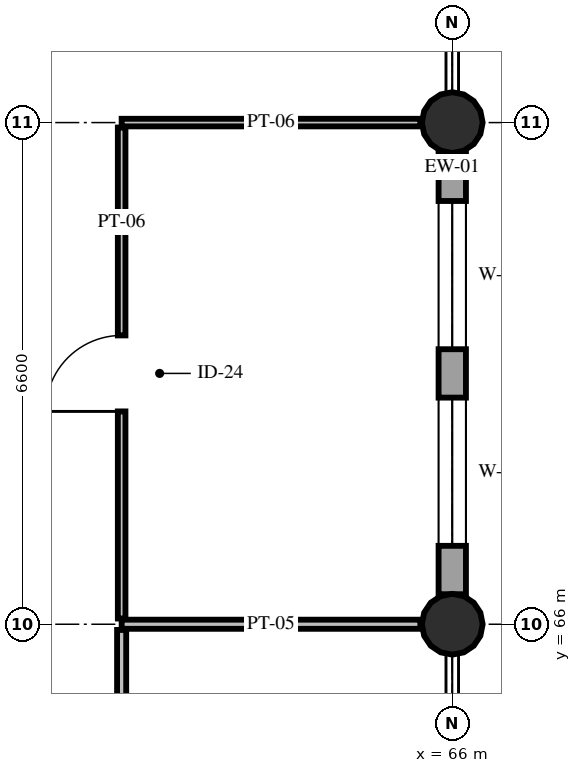
"""IFC4 building model, lengths in metres.
Left out: names, types, materials, properties, quantities, classifications, styles, units other than length and angle.
Written with IfcOpenShell. Run it as: python <this file> out.ifc"""

import sys

from ifc_helpers import new_model, si_unit, direction, frame, frame_2d, origin, origin_2d, place, context, subcontext, project, spatial, rectangle, circle, extrude, element, fill, save


model = new_model("IFC4")
c1 = context("Model", 3, precision=1e-05, world=origin(), true_north=direction((0.0, 1.0)))
c2 = subcontext(c1, "Body", "Model", "MODEL_VIEW")
j1 = project(units=[si_unit("LENGTHUNIT", "METRE"), si_unit("PLANEANGLEUNIT", "RADIAN")], contexts=[c1])
p1 = place(None, origin())
s1 = spatial("IfcSite", under=j1, at=p1, CompositionType="ELEMENT")
p2 = place(p1, origin())
s2 = spatial("IfcBuilding", under=s1, at=p2, CompositionType="ELEMENT")
p3 = place(p2, frame((0.0, 0.0, 10.2)))
s3 = spatial("IfcBuildingStorey", under=s2, at=p3, CompositionType="ELEMENT", Elevation=10.2)
for number, where, z_axis, x_axis in (
    (1, (66.0, 66.0, 0.0), (0.0, 0.0, 1.0), (1.0, 0.0, 0.0)),
    (2, (66.0, 72.6, 0.0), (0.0, 0.0, 1.0), (1.0, 0.0, 0.0)),
):
    element("IfcColumn", number, at=place(p3, frame(where, z_axis=z_axis, x_axis=x_axis)), inside=s3, PredefinedType="COLUMN", context=c2, shape_type="SweptSolid", body=[
        extrude(circle(Radius=0.4, at=origin_2d()), origin(), (0.0, 0.0, 1.0), 4.8),
    ])
p4 = place(p3, frame((66.0, 72.205, 0.0), z_axis=(0.0, 0.0, 1.0), x_axis=(0.0, -1.0, 0.0)))
e3 = element("IfcWall", 3, at=p4, inside=s3, PredefinedType="STANDARD", context=c2, shape_type="SweptSolid", body=[
    extrude(rectangle(XDim=5.81, YDim=0.36, at=frame_2d((2.905, 0.0))), origin(), (0.0, 0.0, 1.0), 3.95),
])
p5 = place(p4, frame((0.637, 0.0, 0.85)))
e4 = element("IfcOpeningElement", 4, at=p5, cuts=e3, PredefinedType="OPENING", context=c2, shape_type="SweptSolid", body=[
    extrude(rectangle(XDim=1.95, YDim=1.86, at=frame_2d((0.975, 0.93))), frame((0.0, 0.195, 0.0), z_axis=(0.0, -1.0, 0.0), x_axis=(1.0, 0.0, 0.0)), (0.0, 0.0, 1.0), 0.39),
])
p6 = place(p4, frame((3.223, 0.0, 0.85)))
e5 = element("IfcOpeningElement", 5, at=p6, cuts=e3, PredefinedType="OPENING", context=c2, shape_type="SweptSolid", body=[
    extrude(rectangle(XDim=1.95, YDim=1.86, at=frame_2d((0.975, 0.93))), frame((0.0, 0.195, 0.0), z_axis=(0.0, -1.0, 0.0), x_axis=(1.0, 0.0, 0.0)), (0.0, 0.0, 1.0), 0.39),
])
p7 = place(p3, frame((61.65, 66.0, 0.0), z_axis=(0.0, 0.0, 1.0), x_axis=(1.0, 0.0, 0.0)))
e6 = element("IfcWall", 6, at=p7, inside=s3, PredefinedType="PARTITIONING", context=c2, shape_type="SweptSolid", body=[
    extrude(rectangle(XDim=3.93, YDim=0.12, at=frame_2d((1.965, 0.0))), origin(), (0.0, 0.0, 1.0), 4.13),
])
p8 = place(p3, frame((61.65, 51.075, 0.0), z_axis=(0.0, 0.0, 1.0), x_axis=(0.0, 1.0, 0.0)))
e7 = element("IfcWall", 7, at=p8, inside=s3, PredefinedType="PARTITIONING", context=c2, shape_type="SweptSolid", body=[
    extrude(rectangle(XDim=14.85, YDim=0.12, at=frame_2d((7.425, 0.0))), origin(), (0.0, 0.0, 1.0), 4.13),
])
p9 = place(p8, frame((5.585, 0.0, 0.0)))
e8 = element("IfcOpeningElement", 8, at=p9, cuts=e7, PredefinedType="OPENING", context=c2, shape_type="SweptSolid", body=[
    extrude(rectangle(XDim=1.68, YDim=2.3, at=frame_2d((0.84, 1.15))), frame((0.0, 0.075, 0.0), z_axis=(0.0, -1.0, 0.0), x_axis=(1.0, 0.0, 0.0)), (0.0, 0.0, 1.0), 0.15),
])
p10 = place(p3, frame((61.65, 72.6, 0.0), z_axis=(0.0, 0.0, 1.0), x_axis=(1.0, 0.0, 0.0)))
e9 = element("IfcWall", 9, at=p10, inside=s3, PredefinedType="PARTITIONING", context=c2, shape_type="SweptSolid", body=[
    extrude(rectangle(XDim=3.93, YDim=0.1, at=frame_2d((1.965, 0.0))), origin(), (0.0, 0.0, 1.0), 4.13),
])
p11 = place(p3, frame((61.65, 66.075, 0.0), z_axis=(0.0, 0.0, 1.0), x_axis=(0.0, 1.0, 0.0)))
e10 = element("IfcWall", 10, at=p11, inside=s3, PredefinedType="PARTITIONING", context=c2, shape_type="SweptSolid", body=[
    extrude(rectangle(XDim=6.46, YDim=0.1, at=frame_2d((3.23, 0.0))), origin(), (0.0, 0.0, 1.0), 4.13),
])
p12 = place(p11, frame((2.725, 0.0, 0.0)))
e11 = element("IfcOpeningElement", 11, at=p12, cuts=e10, PredefinedType="OPENING", context=c2, shape_type="SweptSolid", body=[
    extrude(rectangle(XDim=1.0, YDim=2.15, at=frame_2d((0.5, 1.075))), frame((0.0, 0.065, 0.0), z_axis=(0.0, -1.0, 0.0), x_axis=(1.0, 0.0, 0.0)), (0.0, 0.0, 1.0), 0.13),
])
p13 = place(p5, origin())
e12 = element("IfcWindow", 12, at=p13, inside=s3, PartitioningType="DOUBLE_PANEL_VERTICAL", PredefinedType="WINDOW", context=c2, shape_type="SweptSolid", body=[
    extrude(rectangle(XDim=1.95, YDim=1.86, at=frame_2d((0.975, 0.93))), frame((0.0, 0.03, 0.0), z_axis=(0.0, -1.0, 0.0), x_axis=(1.0, 0.0, 0.0)), (0.0, 0.0, 1.0), 0.06),
])
fill(e4, e12)
p14 = place(p6, origin())
e13 = element("IfcWindow", 13, at=p14, inside=s3, PartitioningType="DOUBLE_PANEL_VERTICAL", PredefinedType="WINDOW", context=c2, shape_type="SweptSolid", body=[
    extrude(rectangle(XDim=1.95, YDim=1.86, at=frame_2d((0.975, 0.93))), frame((0.0, 0.03, 0.0), z_axis=(0.0, -1.0, 0.0), x_axis=(1.0, 0.0, 0.0)), (0.0, 0.0, 1.0), 0.06),
])
fill(e5, e13)
p15 = place(p12, origin())
e14 = element("IfcDoor", 14, at=p15, inside=s3, OperationType="SINGLE_SWING_LEFT", PredefinedType="DOOR", context=c2, shape_type="SweptSolid", body=[
    extrude(rectangle(XDim=1.0, YDim=2.15, at=frame_2d((0.5, 1.075))), frame((0.0, 0.025, 0.0), z_axis=(0.0, -1.0, 0.0), x_axis=(1.0, 0.0, 0.0)), (0.0, 0.0, 1.0), 0.05),
])
fill(e11, e14)
save(model, sys.argv[1])
